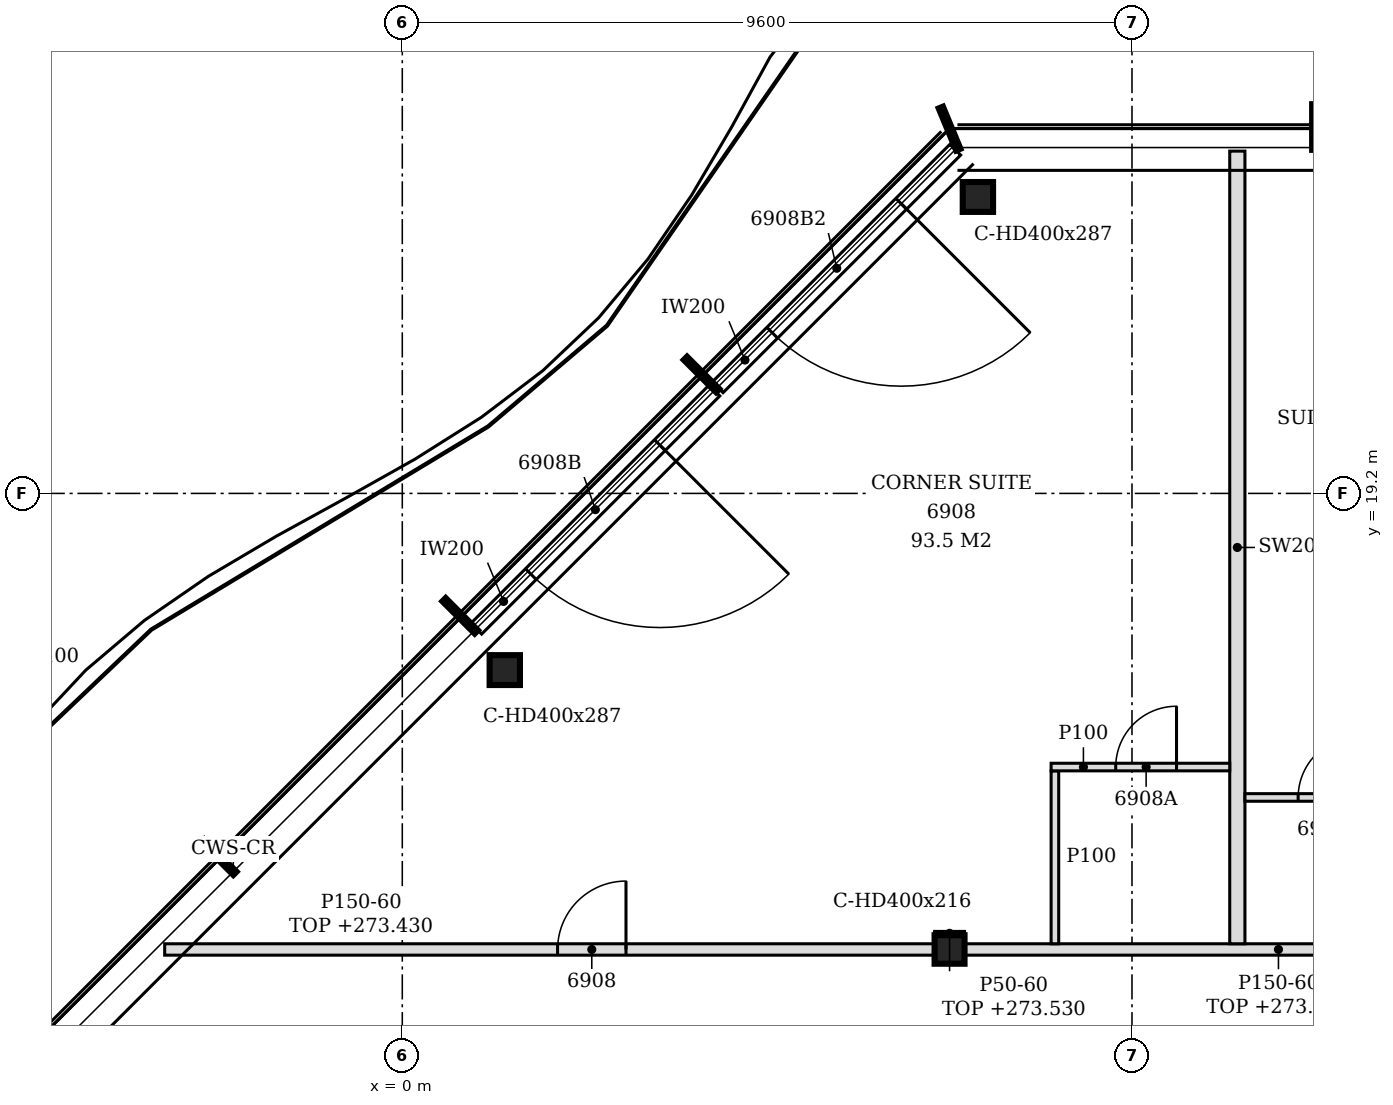
"""IFC4 building model, lengths in metres.
Left out: names, types, materials, properties, quantities, classifications, styles, units other than length and angle.
Written with IfcOpenShell. Run it as: python <this file> out.ifc"""

import sys

from ifc_helpers import new_model, si_unit, direction, frame, frame_2d, origin, origin_2d, place, context, subcontext, project, spatial, polyline, rectangle, i_section, outline, extrude, element, fill, save


model = new_model("IFC4")
c1 = context("Model", 3, precision=1e-05, world=origin(), true_north=direction((0.0, 1.0)))
c2 = subcontext(c1, "Body", "Model", "MODEL_VIEW")
j1 = project(units=[si_unit("LENGTHUNIT", "METRE"), si_unit("PLANEANGLEUNIT", "RADIAN")], contexts=[c1])
p1 = place(None, origin())
s1 = spatial("IfcSite", under=j1, at=p1, CompositionType="ELEMENT")
p2 = place(p1, origin())
s2 = spatial("IfcBuilding", under=s1, at=p2, CompositionType="ELEMENT")
p3 = place(p2, frame((0.0, 0.0, 270.6)))
s3 = spatial("IfcBuildingStorey", under=s2, at=p3, CompositionType="ELEMENT", Elevation=270.6)
for number, where, z_axis, x_axis in (
    (1, (7.573, 23.1, -0.15), (0.0, 0.0, 1.0), (1.0, 0.0, 0.0)),
    (2, (1.348, 16.876, -0.15), (0.0, 0.0, 1.0), (1.0, 0.0, 0.0)),
):
    element("IfcColumn", number, at=place(p3, frame(where, z_axis=z_axis, x_axis=x_axis)), inside=s3, PredefinedType="COLUMN", context=c2, shape_type="SweptSolid", body=[
        extrude(i_section(OverallWidth=0.399, OverallDepth=0.393, WebThickness=0.023, FlangeThickness=0.037, FilletRadius=0.015, at=origin_2d()), origin(), (0.0, 0.0, 1.0), 3.6),
    ])
p4 = place(p3, frame((7.2, 13.2, -0.15), z_axis=(0.0, 0.0, 1.0), x_axis=(1.0, 0.0, 0.0)))
e3 = element("IfcColumn", 3, at=p4, inside=s3, PredefinedType="COLUMN", context=c2, shape_type="SweptSolid", body=[
    extrude(i_section(OverallWidth=0.394, OverallDepth=0.375, WebThickness=0.017, FlangeThickness=0.028, FilletRadius=0.015, at=origin_2d()), origin(), (0.0, 0.0, 1.0), 3.6),
])
p5 = place(p3, frame((7.275, 23.722, 0.0), z_axis=(0.0, 0.0, 1.0), x_axis=(-0.707134392299, -0.707079168996, 0.0)))
e4 = element("IfcWall", 4, at=p5, inside=s3, PredefinedType="NOTDEFINED", context=c2, shape_type="SweptSolid", body=[
    extrude(rectangle(XDim=4.421, YDim=0.2, at=frame_2d((2.21, 0.0))), origin(), (0.0, 0.0, 1.0), 3.45),
])
p6 = place(p5, frame((1.005, 0.0, 0.0)))
e5 = element("IfcOpeningElement", 5, at=p6, cuts=e4, PredefinedType="OPENING", context=c2, shape_type="SweptSolid", body=[
    extrude(rectangle(XDim=2.4, YDim=2.4, at=frame_2d((1.2, 1.2))), frame((0.0, 0.11, 0.0), z_axis=(0.0, -1.0, 0.0), x_axis=(1.0, 0.0, 0.0)), (0.0, 0.0, 1.0), 0.22),
])
p7 = place(p3, frame((4.107, 20.553, 0.0), z_axis=(0.0, 0.0, 1.0), x_axis=(-0.707079231393, -0.707134329907, 0.0)))
e6 = element("IfcWall", 6, at=p7, inside=s3, PredefinedType="NOTDEFINED", context=c2, shape_type="SweptSolid", body=[
    extrude(rectangle(XDim=4.431, YDim=0.2, at=frame_2d((2.215, 0.0))), origin(), (0.0, 0.0, 1.0), 3.45),
])
p8 = place(p7, frame((1.015, 0.0, 0.0)))
e7 = element("IfcOpeningElement", 7, at=p8, cuts=e6, PredefinedType="OPENING", context=c2, shape_type="SweptSolid", body=[
    extrude(rectangle(XDim=2.4, YDim=2.4, at=frame_2d((1.2, 1.2))), frame((0.0, 0.11, 0.0), z_axis=(0.0, -1.0, 0.0), x_axis=(1.0, 0.0, 0.0)), (0.0, 0.0, 1.0), 0.22),
])
p9 = place(p3, frame((-3.126, 13.2, 0.0), z_axis=(0.0, 0.0, 1.0), x_axis=(1.0, 0.0, 0.0)))
e8 = element("IfcWall", 8, at=p9, inside=s3, PredefinedType="PARTITIONING", context=c2, shape_type="SweptSolid", body=[
    extrude(outline(polyline([(0.0, 0.0), (10.129, 0.0), (10.129, 2.83), (1.369, 2.83), (1.367, 2.63), (0.229, 2.63), (0.227, 2.83), (0.0, 2.83), (0.0, 0.0)])), frame((0.0, 0.075, 0.0), z_axis=(0.0, -1.0, 0.0), x_axis=(1.0, 0.0, 0.0)), (0.0, 0.0, 1.0), 0.15),
])
p10 = place(p9, frame((5.169, 0.0, 0.0)))
e9 = element("IfcOpeningElement", 9, at=p10, cuts=e8, PredefinedType="OPENING", context=c2, shape_type="SweptSolid", body=[
    extrude(rectangle(XDim=0.9, YDim=2.1, at=frame_2d((0.45, 1.05))), frame((0.0, 0.085, 0.0), z_axis=(0.0, -1.0, 0.0), x_axis=(1.0, 0.0, 0.0)), (0.0, 0.0, 1.0), 0.17),
])
p11 = place(p3, frame((7.397, 13.2, 0.0), z_axis=(0.0, 0.0, 1.0), x_axis=(1.0, 0.0, 0.0)))
e10 = element("IfcWall", 10, at=p11, inside=s3, PredefinedType="PARTITIONING", context=c2, shape_type="SweptSolid", body=[
    extrude(rectangle(XDim=11.606, YDim=0.15, at=frame_2d((5.803, 0.0))), origin(), (0.0, 0.0, 1.0), 2.83),
])
p12 = place(p11, frame((8.26, 0.0, 0.0)))
e11 = element("IfcOpeningElement", 11, at=p12, cuts=e10, PredefinedType="OPENING", context=c2, shape_type="SweptSolid", body=[
    extrude(rectangle(XDim=0.9, YDim=2.1, at=frame_2d((0.45, 1.05))), frame((0.0, 0.085, 0.0), z_axis=(0.0, -1.0, 0.0), x_axis=(1.0, 0.0, 0.0)), (0.0, 0.0, 1.0), 0.17),
])
p13 = place(p3, frame((8.586, 13.275, 0.0), z_axis=(0.0, 0.0, 1.0), x_axis=(0.0, 1.0, 0.0)))
e12 = element("IfcWall", 12, at=p13, inside=s3, PredefinedType="PARTITIONING", context=c2, shape_type="SweptSolid", body=[
    extrude(outline(polyline([(0.0, 0.0), (2.275, 0.0), (2.275, 3.45), (0.075, 3.45), (0.073, 2.83), (0.0, 2.83), (0.0, 0.0)])), frame((0.0, 0.05, 0.0), z_axis=(0.0, -1.0, 0.0), x_axis=(1.0, 0.0, 0.0)), (0.0, 0.0, 1.0), 0.1),
])
p14 = place(p3, frame((10.986, 13.275, 0.0), z_axis=(0.0, 0.0, 1.0), x_axis=(0.0, 1.0, 0.0)))
e13 = element("IfcWall", 13, at=p14, inside=s3, PredefinedType="PARTITIONING", context=c2, shape_type="SweptSolid", body=[
    extrude(outline(polyline([(0.0, 0.0), (10.428, 0.0), (10.428, 3.45), (9.975, 3.45), (9.973, 2.93), (9.675, 2.93), (9.673, 3.45), (6.03, 3.45), (6.028, 2.88), (5.82, 2.88), (5.818, 3.45), (0.075, 3.45), (0.073, 2.83), (0.0, 2.83), (0.0, 0.0)])), frame((0.0, 0.1, 0.0), z_axis=(0.0, -1.0, 0.0), x_axis=(1.0, 0.0, 0.0)), (0.0, 0.0, 1.0), 0.2),
])
p15 = place(p3, frame((11.086, 15.2, 0.0), z_axis=(0.0, 0.0, 1.0), x_axis=(1.0, 0.0, 0.0)))
e14 = element("IfcWall", 14, at=p15, inside=s3, PredefinedType="PARTITIONING", context=c2, shape_type="SweptSolid", body=[
    extrude(rectangle(XDim=2.35, YDim=0.1, at=frame_2d((1.175, 0.0))), origin(), (0.0, 0.0, 1.0), 3.45),
])
p16 = place(p15, frame((0.7, 0.0, 0.0)))
e15 = element("IfcOpeningElement", 15, at=p16, cuts=e14, PredefinedType="OPENING", context=c2, shape_type="SweptSolid", body=[
    extrude(rectangle(XDim=0.8, YDim=2.1, at=frame_2d((0.4, 1.05))), frame((0.0, 0.06, 0.0), z_axis=(0.0, -1.0, 0.0), x_axis=(1.0, 0.0, 0.0)), (0.0, 0.0, 1.0), 0.12),
])
p17 = place(p3, frame((8.536, 15.6, 0.0), z_axis=(0.0, 0.0, 1.0), x_axis=(1.0, 0.0, 0.0)))
e16 = element("IfcWall", 16, at=p17, inside=s3, PredefinedType="PARTITIONING", context=c2, shape_type="SweptSolid", body=[
    extrude(rectangle(XDim=2.35, YDim=0.1, at=frame_2d((1.175, 0.0))), origin(), (0.0, 0.0, 1.0), 3.45),
])
p18 = place(p17, frame((0.85, 0.0, 0.0)))
e17 = element("IfcOpeningElement", 17, at=p18, cuts=e16, PredefinedType="OPENING", context=c2, shape_type="SweptSolid", body=[
    extrude(rectangle(XDim=0.8, YDim=2.1, at=frame_2d((0.4, 1.05))), frame((0.0, 0.06, 0.0), z_axis=(0.0, -1.0, 0.0), x_axis=(1.0, 0.0, 0.0)), (0.0, 0.0, 1.0), 0.12),
])
p19 = place(p3, frame((7.003, 13.413, 0.0), z_axis=(0.0, 0.0, 1.0), x_axis=(1.0, 0.0, 0.0)))
e18 = element("IfcWall", 18, at=p19, inside=s3, PredefinedType="PARTITIONING", context=c2, shape_type="SweptSolid", body=[
    extrude(rectangle(XDim=0.394, YDim=0.05, at=frame_2d((0.197, 0.0))), origin(), (0.0, 0.0, 1.0), 2.93),
])
p20 = place(p6, origin())
e19 = element("IfcDoor", 19, at=p20, inside=s3, OperationType="SINGLE_SWING_LEFT", PredefinedType="DOOR", context=c2, shape_type="SweptSolid", body=[
    extrude(rectangle(XDim=2.4, YDim=2.4, at=frame_2d((1.2, 1.2))), frame((0.0, 0.025, 0.0), z_axis=(0.0, -1.0, 0.0), x_axis=(1.0, 0.0, 0.0)), (0.0, 0.0, 1.0), 0.05),
])
fill(e5, e19)
p21 = place(p8, origin())
e20 = element("IfcDoor", 20, at=p21, inside=s3, OperationType="SINGLE_SWING_LEFT", PredefinedType="DOOR", context=c2, shape_type="SweptSolid", body=[
    extrude(rectangle(XDim=2.4, YDim=2.4, at=frame_2d((1.2, 1.2))), frame((0.0, 0.025, 0.0), z_axis=(0.0, -1.0, 0.0), x_axis=(1.0, 0.0, 0.0)), (0.0, 0.0, 1.0), 0.05),
])
fill(e7, e20)
p22 = place(p16, origin())
e21 = element("IfcDoor", 21, at=p22, inside=s3, OperationType="SINGLE_SWING_RIGHT", PredefinedType="DOOR", context=c2, shape_type="SweptSolid", body=[
    extrude(rectangle(XDim=0.8, YDim=2.1, at=frame_2d((0.4, 1.05))), frame((0.0, 0.025, 0.0), z_axis=(0.0, -1.0, 0.0), x_axis=(1.0, 0.0, 0.0)), (0.0, 0.0, 1.0), 0.05),
])
fill(e15, e21)
p23 = place(p10, origin())
e22 = element("IfcDoor", 22, at=p23, inside=s3, OperationType="SINGLE_SWING_RIGHT", PredefinedType="DOOR", context=c2, shape_type="SweptSolid", body=[
    extrude(rectangle(XDim=0.9, YDim=2.1, at=frame_2d((0.45, 1.05))), frame((0.0, 0.025, 0.0), z_axis=(0.0, -1.0, 0.0), x_axis=(1.0, 0.0, 0.0)), (0.0, 0.0, 1.0), 0.05),
])
fill(e9, e22)
p24 = place(p18, origin())
e23 = element("IfcDoor", 23, at=p24, inside=s3, OperationType="SINGLE_SWING_RIGHT", PredefinedType="DOOR", context=c2, shape_type="SweptSolid", body=[
    extrude(rectangle(XDim=0.8, YDim=2.1, at=frame_2d((0.4, 1.05))), frame((0.0, 0.025, 0.0), z_axis=(0.0, -1.0, 0.0), x_axis=(1.0, 0.0, 0.0)), (0.0, 0.0, 1.0), 0.05),
])
fill(e17, e23)
save(model, sys.argv[1])
